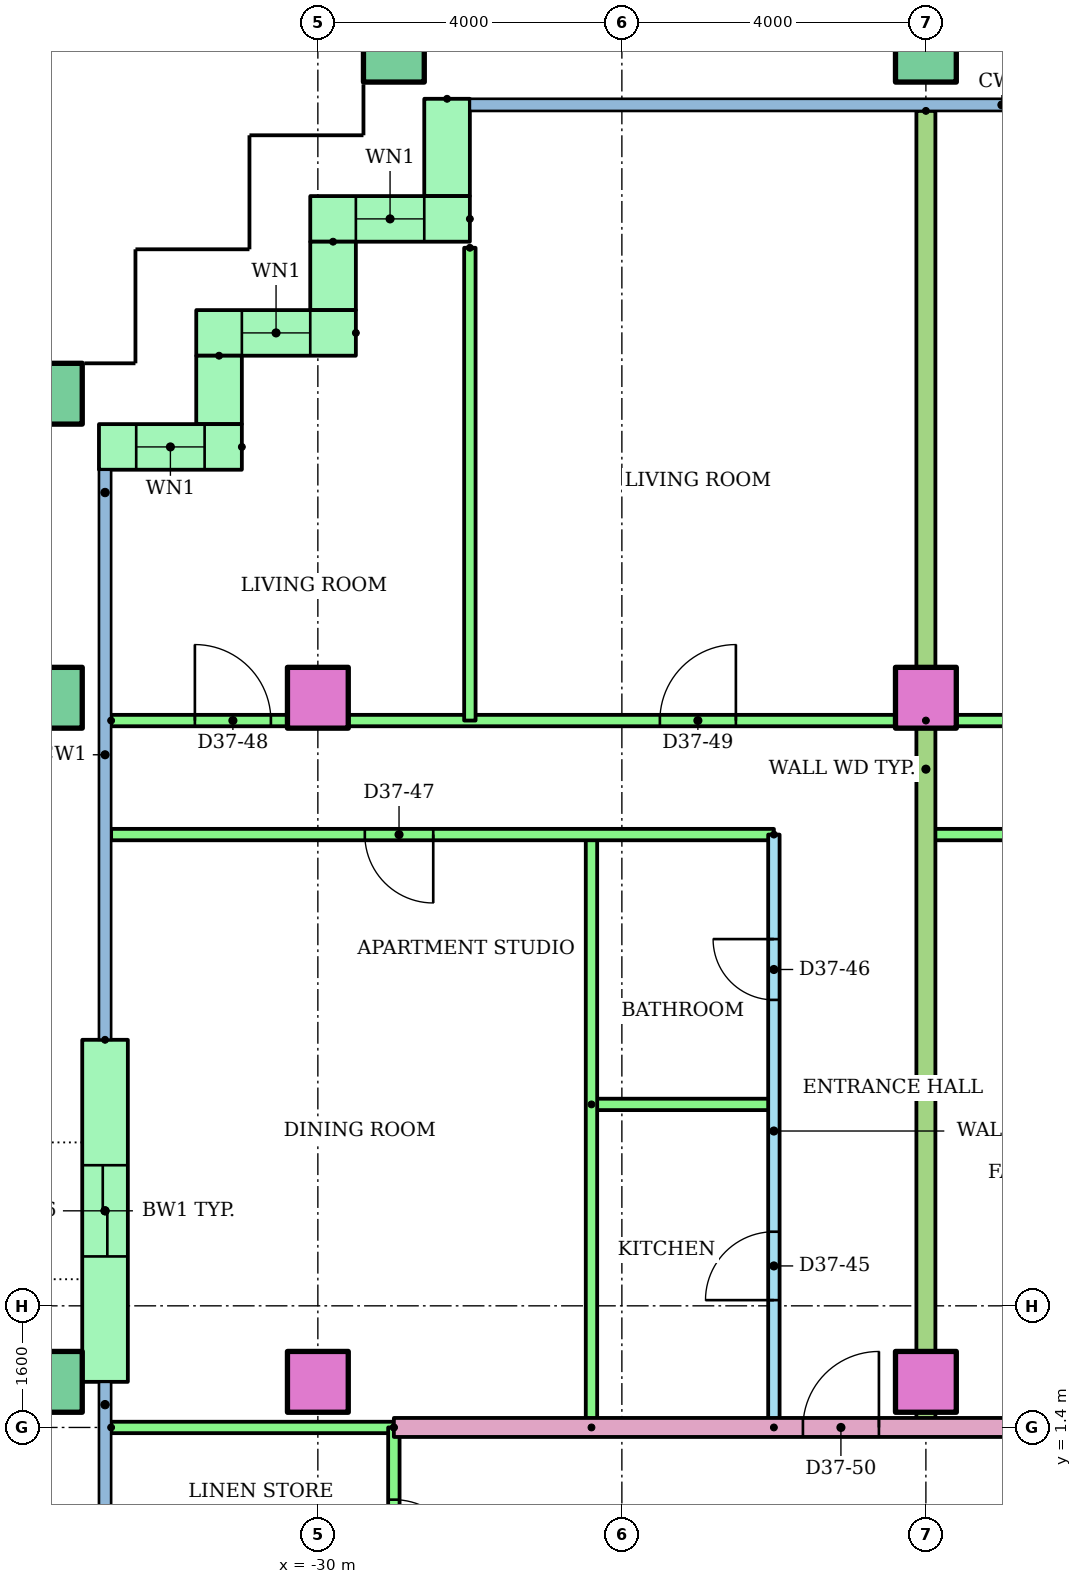
"""IFC4 building model, lengths in metres.
Left out: names, types, materials, properties, quantities, classifications, styles, units other than length and angle.
Written with IfcOpenShell. Run it as: python <this file> out.ifc"""

import sys

from ifc_helpers import new_model, si_unit, direction, frame, frame_2d, origin, origin_2d, place, context, subcontext, project, spatial, rectangle, hollow_rectangle, extrude, element, fill, save


model = new_model("IFC4")
c1 = context("Model", 3, precision=1e-05, world=origin(), true_north=direction((0.0, 1.0)))
c2 = subcontext(c1, "Body", "Model", "MODEL_VIEW")
j1 = project(units=[si_unit("LENGTHUNIT", "METRE"), si_unit("PLANEANGLEUNIT", "RADIAN")], contexts=[c1])
p1 = place(None, origin())
s1 = spatial("IfcSite", under=j1, at=p1, CompositionType="ELEMENT")
p2 = place(p1, origin())
s2 = spatial("IfcBuilding", under=s1, at=p2, CompositionType="ELEMENT")
p3 = place(p2, frame((0.0, 0.0, 142.2)))
s3 = spatial("IfcBuildingStorey", under=s2, at=p3, CompositionType="ELEMENT", Elevation=142.2)
p4 = place(p3, frame((-33.5, 2.0, 0.0)))
e1 = element("IfcColumn", 1, at=p4, inside=s3, PredefinedType="COLUMN", context=c2, shape_type="SweptSolid", body=[
    extrude(hollow_rectangle(XDim=0.8, YDim=0.8, WallThickness=0.04, at=origin_2d()), origin(), (0.0, 0.0, 1.0), 3.2),
])
for number, where in (
    (2, (-30.0, 2.0, 0.0)),
    (3, (-22.0, 2.0, 0.0)),
):
    element("IfcColumn", number, at=place(p3, frame(where)), inside=s3, PredefinedType="COLUMN", context=c2, shape_type="SweptSolid", body=[
        extrude(rectangle(XDim=0.8, YDim=0.8, at=origin_2d()), origin(), (0.0, 0.0, 1.0), 3.2),
    ])
p5 = place(p3, frame((-33.5, 11.0, 0.0)))
e4 = element("IfcColumn", 4, at=p5, inside=s3, PredefinedType="COLUMN", context=c2, shape_type="SweptSolid", body=[
    extrude(hollow_rectangle(XDim=0.8, YDim=0.8, WallThickness=0.04, at=origin_2d()), origin(), (0.0, 0.0, 1.0), 3.2),
])
for number, where in (
    (5, (-30.0, 11.0, 0.0)),
    (6, (-22.0, 11.0, 0.0)),
):
    element("IfcColumn", number, at=place(p3, frame(where)), inside=s3, PredefinedType="COLUMN", context=c2, shape_type="SweptSolid", body=[
        extrude(rectangle(XDim=0.8, YDim=0.8, at=origin_2d()), origin(), (0.0, 0.0, 1.0), 3.2),
    ])
for number, where in (
    (7, (-33.5, 15.0, 0.0)),
    (8, (-29.0, 19.5, 0.0)),
    (9, (-22.0, 19.5, 0.0)),
):
    element("IfcColumn", number, at=place(p3, frame(where)), inside=s3, PredefinedType="COLUMN", context=c2, shape_type="SweptSolid", body=[
        extrude(hollow_rectangle(XDim=0.8, YDim=0.8, WallThickness=0.04, at=origin_2d()), origin(), (0.0, 0.0, 1.0), 3.2),
    ])
p6 = place(p3, frame((-28.3, 18.88, 0.0), z_axis=(0.0, 0.0, 1.0), x_axis=(0.0, -1.0, 0.0)))
e10 = element("IfcWall", 10, at=p6, inside=s3, PredefinedType="STANDARD", context=c2, shape_type="SweptSolid", body=[
    extrude(rectangle(XDim=1.28, YDim=0.6, at=frame_2d((0.64, 0.0))), origin(), (0.0, 0.0, 1.0), 2.92),
])
p7 = place(p3, frame((-28.0, 17.3, 0.0), z_axis=(0.0, 0.0, 1.0), x_axis=(-1.0, 0.0, 0.0)))
e11 = element("IfcWall", 11, at=p7, inside=s3, PredefinedType="STANDARD", context=c2, shape_type="SweptSolid", body=[
    extrude(rectangle(XDim=2.1, YDim=0.6, at=frame_2d((1.05, 0.0))), origin(), (0.0, 0.0, 1.0), 2.92),
])
p8 = place(p7, frame((0.6, 0.0, 0.9)))
e12 = element("IfcOpeningElement", 12, at=p8, cuts=e11, PredefinedType="OPENING", context=c2, shape_type="SweptSolid", body=[
    extrude(rectangle(XDim=0.9, YDim=1.5, at=frame_2d((0.45, 0.75))), frame((0.0, 0.31, 0.0), z_axis=(0.0, -1.0, 0.0), x_axis=(1.0, 0.0, 0.0)), (0.0, 0.0, 1.0), 0.62),
])
p9 = place(p3, frame((-29.8, 17.0, 0.0), z_axis=(0.0, 0.0, 1.0), x_axis=(0.0, -1.0, 0.0)))
e13 = element("IfcWall", 13, at=p9, inside=s3, PredefinedType="STANDARD", context=c2, shape_type="SweptSolid", body=[
    extrude(rectangle(XDim=0.9, YDim=0.6, at=frame_2d((0.45, 0.0))), origin(), (0.0, 0.0, 1.0), 2.92),
])
p10 = place(p3, frame((-29.5, 15.8, 0.0), z_axis=(0.0, 0.0, 1.0), x_axis=(-1.0, 0.0, 0.0)))
e14 = element("IfcWall", 14, at=p10, inside=s3, PredefinedType="STANDARD", context=c2, shape_type="SweptSolid", body=[
    extrude(rectangle(XDim=2.1, YDim=0.6, at=frame_2d((1.05, 0.0))), origin(), (0.0, 0.0, 1.0), 2.92),
])
p11 = place(p10, frame((0.6, 0.0, 0.9)))
e15 = element("IfcOpeningElement", 15, at=p11, cuts=e14, PredefinedType="OPENING", context=c2, shape_type="SweptSolid", body=[
    extrude(rectangle(XDim=0.9, YDim=1.5, at=frame_2d((0.45, 0.75))), frame((0.0, 0.31, 0.0), z_axis=(0.0, -1.0, 0.0), x_axis=(1.0, 0.0, 0.0)), (0.0, 0.0, 1.0), 0.62),
])
p12 = place(p3, frame((-31.3, 15.5, 0.0), z_axis=(0.0, 0.0, 1.0), x_axis=(0.0, -1.0, 0.0)))
e16 = element("IfcWall", 16, at=p12, inside=s3, PredefinedType="STANDARD", context=c2, shape_type="SweptSolid", body=[
    extrude(rectangle(XDim=0.9, YDim=0.6, at=frame_2d((0.45, 0.0))), origin(), (0.0, 0.0, 1.0), 2.92),
])
p13 = place(p3, frame((-31.0, 14.3, 0.0), z_axis=(0.0, 0.0, 1.0), x_axis=(-1.0, 0.0, 0.0)))
e17 = element("IfcWall", 17, at=p13, inside=s3, PredefinedType="STANDARD", context=c2, shape_type="SweptSolid", body=[
    extrude(rectangle(XDim=1.88, YDim=0.6, at=frame_2d((0.94, 0.0))), origin(), (0.0, 0.0, 1.0), 2.92),
])
p14 = place(p13, frame((0.49, 0.0, 0.9)))
e18 = element("IfcOpeningElement", 18, at=p14, cuts=e17, PredefinedType="OPENING", context=c2, shape_type="SweptSolid", body=[
    extrude(rectangle(XDim=0.9, YDim=1.5, at=frame_2d((0.45, 0.75))), frame((0.0, 0.31, 0.0), z_axis=(0.0, -1.0, 0.0), x_axis=(1.0, 0.0, 0.0)), (0.0, 0.0, 1.0), 0.62),
])
p15 = place(p3, frame((-32.8, 6.5, 0.0), z_axis=(0.0, 0.0, 1.0), x_axis=(0.0, -1.0, 0.0)))
e19 = element("IfcWall", 19, at=p15, inside=s3, PredefinedType="STANDARD", context=c2, shape_type="SweptSolid", body=[
    extrude(rectangle(XDim=4.5, YDim=0.6, at=frame_2d((2.25, 0.0))), origin(), (0.0, 0.0, 1.0), 2.92),
])
p16 = place(p15, frame((1.65, 0.0, 0.0)))
e20 = element("IfcOpeningElement", 20, at=p16, cuts=e19, PredefinedType="OPENING", context=c2, shape_type="SweptSolid", body=[
    extrude(rectangle(XDim=1.2, YDim=2.1, at=frame_2d((0.6, 1.05))), frame((0.0, 0.31, 0.0), z_axis=(0.0, -1.0, 0.0), x_axis=(1.0, 0.0, 0.0)), (0.0, 0.0, 1.0), 0.62),
])
p17 = place(p3, frame((-24.0, 1.4, 0.0), z_axis=(0.0, 0.0, 1.0), x_axis=(0.0, 1.0, 0.0)))
e21 = element("IfcWall", 21, at=p17, inside=s3, PredefinedType="PARTITIONING", context=c2, shape_type="SweptSolid", body=[
    extrude(rectangle(XDim=7.8, YDim=0.15, at=frame_2d((3.9, 0.0))), origin(), (0.0, 0.0, 1.0), 2.4),
])
p18 = place(p17, frame((1.675, 0.0, 0.0)))
e22 = element("IfcOpeningElement", 22, at=p18, cuts=e21, PredefinedType="OPENING", context=c2, shape_type="SweptSolid", body=[
    extrude(rectangle(XDim=0.9, YDim=2.1, at=frame_2d((0.45, 1.05))), frame((0.0, 0.085, 0.0), z_axis=(0.0, -1.0, 0.0), x_axis=(1.0, 0.0, 0.0)), (0.0, 0.0, 1.0), 0.17),
])
p19 = place(p17, frame((5.625, 0.0, 0.0)))
e23 = element("IfcOpeningElement", 23, at=p19, cuts=e21, PredefinedType="OPENING", context=c2, shape_type="SweptSolid", body=[
    extrude(rectangle(XDim=0.8, YDim=2.1, at=frame_2d((0.4, 1.05))), frame((0.0, 0.085, 0.0), z_axis=(0.0, -1.0, 0.0), x_axis=(1.0, 0.0, 0.0)), (0.0, 0.0, 1.0), 0.17),
])
p20 = place(p3, frame((-26.4, 5.65, 0.0)))
e24 = element("IfcWall", 24, at=p20, inside=s3, PredefinedType="PARTITIONING", context=c2, shape_type="SweptSolid", body=[
    extrude(rectangle(XDim=2.4, YDim=0.15, at=frame_2d((1.2, 0.0))), origin(), (0.0, 0.0, 1.0), 2.4),
])
p21 = place(p3, frame((-26.4, 1.4, 0.0), z_axis=(0.0, 0.0, 1.0), x_axis=(0.0, 1.0, 0.0)))
e25 = element("IfcWall", 25, at=p21, inside=s3, PredefinedType="PARTITIONING", context=c2, shape_type="SweptSolid", body=[
    extrude(rectangle(XDim=7.8, YDim=0.15, at=frame_2d((3.9, 0.0))), origin(), (0.0, 0.0, 1.0), 2.4),
])
p22 = place(p3, frame((-24.0, 9.2, 0.0), z_axis=(0.0, 0.0, 1.0), x_axis=(-1.0, 0.0, 0.0)))
e26 = element("IfcWall", 26, at=p22, inside=s3, PredefinedType="PARTITIONING", context=c2, shape_type="SweptSolid", body=[
    extrude(rectangle(XDim=8.72, YDim=0.15, at=frame_2d((4.36, 0.0))), origin(), (0.0, 0.0, 1.0), 2.4),
])
p23 = place(p22, frame((4.482, 0.0, 0.0)))
e27 = element("IfcOpeningElement", 27, at=p23, cuts=e26, PredefinedType="OPENING", context=c2, shape_type="SweptSolid", body=[
    extrude(rectangle(XDim=0.9, YDim=2.1, at=frame_2d((0.45, 1.05))), frame((0.0, 0.085, 0.0), z_axis=(0.0, -1.0, 0.0), x_axis=(1.0, 0.0, 0.0)), (0.0, 0.0, 1.0), 0.17),
])
p24 = place(p3, frame((-32.72, 10.7, 0.0)))
e28 = element("IfcWall", 28, at=p24, inside=s3, PredefinedType="PARTITIONING", context=c2, shape_type="SweptSolid", body=[
    extrude(rectangle(XDim=10.72, YDim=0.15, at=frame_2d((5.36, 0.0))), origin(), (0.0, 0.0, 1.0), 2.4),
])
p25 = place(p24, frame((1.102, 0.0, 0.0)))
e29 = element("IfcOpeningElement", 29, at=p25, cuts=e28, PredefinedType="OPENING", context=c2, shape_type="SweptSolid", body=[
    extrude(rectangle(XDim=1.0, YDim=2.1, at=frame_2d((0.5, 1.05))), frame((0.0, 0.085, 0.0), z_axis=(0.0, -1.0, 0.0), x_axis=(1.0, 0.0, 0.0)), (0.0, 0.0, 1.0), 0.17),
])
p26 = place(p24, frame((7.22, 0.0, 0.0)))
e30 = element("IfcOpeningElement", 30, at=p26, cuts=e28, PredefinedType="OPENING", context=c2, shape_type="SweptSolid", body=[
    extrude(rectangle(XDim=1.0, YDim=2.1, at=frame_2d((0.5, 1.05))), frame((0.0, 0.085, 0.0), z_axis=(0.0, -1.0, 0.0), x_axis=(1.0, 0.0, 0.0)), (0.0, 0.0, 1.0), 0.17),
])
p27 = place(p3, frame((-28.0, 16.92, 0.0), z_axis=(0.0, 0.0, 1.0), x_axis=(0.0, -1.0, 0.0)))
e31 = element("IfcWall", 31, at=p27, inside=s3, PredefinedType="PARTITIONING", context=c2, shape_type="SweptSolid", body=[
    extrude(rectangle(XDim=6.22, YDim=0.15, at=frame_2d((3.11, 0.0))), origin(), (0.0, 0.0, 1.0), 2.4),
])
p28 = place(p3, frame((-16.0, 9.2, 0.0), z_axis=(0.0, 0.0, 1.0), x_axis=(-1.0, 0.0, 0.0)))
e32 = element("IfcWall", 32, at=p28, inside=s3, PredefinedType="PARTITIONING", context=c2, shape_type="SweptSolid", body=[
    extrude(rectangle(XDim=6.0, YDim=0.15, at=frame_2d((3.0, 0.0))), origin(), (0.0, 0.0, 1.0), 2.4),
])
p29 = place(p28, frame((3.75, 0.0, 0.0)))
e33 = element("IfcOpeningElement", 33, at=p29, cuts=e32, PredefinedType="OPENING", context=c2, shape_type="SweptSolid", body=[
    extrude(rectangle(XDim=0.9, YDim=2.1, at=frame_2d((0.45, 1.05))), frame((0.0, 0.085, 0.0), z_axis=(0.0, -1.0, 0.0), x_axis=(1.0, 0.0, 0.0)), (0.0, 0.0, 1.0), 0.17),
])
p30 = place(p3, frame((-22.0, 10.7, 0.0)))
e34 = element("IfcWall", 34, at=p30, inside=s3, PredefinedType="PARTITIONING", context=c2, shape_type="SweptSolid", body=[
    extrude(rectangle(XDim=8.0, YDim=0.15, at=frame_2d((4.0, 0.0))), origin(), (0.0, 0.0, 1.0), 2.4),
])
p31 = place(p30, frame((3.5, 0.0, 0.0)))
e35 = element("IfcOpeningElement", 35, at=p31, cuts=e34, PredefinedType="OPENING", context=c2, shape_type="SweptSolid", body=[
    extrude(rectangle(XDim=1.0, YDim=2.1, at=frame_2d((0.5, 1.05))), frame((0.0, 0.085, 0.0), z_axis=(0.0, -1.0, 0.0), x_axis=(1.0, 0.0, 0.0)), (0.0, 0.0, 1.0), 0.17),
])
p32 = place(p3, frame((-22.0, 18.721, 0.0), z_axis=(0.0, 0.0, 1.0), x_axis=(0.0, -1.0, 0.0)))
e36 = element("IfcWall", 36, at=p32, inside=s3, PredefinedType="PARTITIONING", context=c2, shape_type="SweptSolid", body=[
    extrude(rectangle(XDim=17.321, YDim=0.25, at=frame_2d((8.661, 0.0))), origin(), (0.0, 0.0, 1.0), 2.4),
])
p33 = place(p3, frame((-29.0, 1.4, 0.0)))
e37 = element("IfcWall", 37, at=p33, inside=s3, PredefinedType="PARTITIONING", context=c2, shape_type="SweptSolid", body=[
    extrude(rectangle(XDim=15.0, YDim=0.25, at=frame_2d((7.5, 0.0))), origin(), (0.0, 0.0, 1.0), 2.4),
])
p34 = place(p33, frame((5.382, 0.0, 0.0)))
e38 = element("IfcOpeningElement", 38, at=p34, cuts=e37, PredefinedType="OPENING", context=c2, shape_type="SweptSolid", body=[
    extrude(rectangle(XDim=1.0, YDim=2.1, at=frame_2d((0.5, 1.05))), frame((0.0, 0.135, 0.0), z_axis=(0.0, -1.0, 0.0), x_axis=(1.0, 0.0, 0.0)), (0.0, 0.0, 1.0), 0.27),
])
p35 = place(p33, frame((13.5, 0.0, 0.0)))
e39 = element("IfcOpeningElement", 39, at=p35, cuts=e37, PredefinedType="OPENING", context=c2, shape_type="SweptSolid", body=[
    extrude(rectangle(XDim=1.0, YDim=2.1, at=frame_2d((0.5, 1.05))), frame((0.0, 0.135, 0.0), z_axis=(0.0, -1.0, 0.0), x_axis=(1.0, 0.0, 0.0)), (0.0, 0.0, 1.0), 0.27),
])
p36 = place(p3, frame((-32.72, 1.4, 0.0)))
e40 = element("IfcWall", 40, at=p36, inside=s3, PredefinedType="PARTITIONING", context=c2, shape_type="SweptSolid", body=[
    extrude(rectangle(XDim=3.72, YDim=0.15, at=frame_2d((1.86, 0.0))), origin(), (0.0, 0.0, 1.0), 2.4),
])
p37 = place(p3, frame((-29.0, 1.4, 0.0), z_axis=(0.0, 0.0, 1.0), x_axis=(0.0, -1.0, 0.0)))
e41 = element("IfcWall", 41, at=p37, inside=s3, PredefinedType="PARTITIONING", context=c2, shape_type="SweptSolid", body=[
    extrude(rectangle(XDim=2.8, YDim=0.15, at=frame_2d((1.4, 0.0))), origin(), (0.0, 0.0, 1.0), 2.4),
])
p38 = place(p37, frame((0.95, 0.0, 0.0)))
e42 = element("IfcOpeningElement", 42, at=p38, cuts=e41, PredefinedType="OPENING", context=c2, shape_type="SweptSolid", body=[
    extrude(rectangle(XDim=0.9, YDim=2.1, at=frame_2d((0.45, 1.05))), frame((0.0, 0.085, 0.0), z_axis=(0.0, -1.0, 0.0), x_axis=(1.0, 0.0, 0.0)), (0.0, 0.0, 1.0), 0.17),
])
p39 = place(p8, origin())
e43 = element("IfcWindow", 43, at=p39, inside=s3, PartitioningType="SINGLE_PANEL", PredefinedType="WINDOW", context=c2, shape_type="SweptSolid", body=[
    extrude(rectangle(XDim=0.9, YDim=1.5, at=frame_2d((0.45, 0.75))), frame((0.0, 0.03, 0.0), z_axis=(0.0, -1.0, 0.0), x_axis=(1.0, 0.0, 0.0)), (0.0, 0.0, 1.0), 0.06),
])
fill(e12, e43)
p40 = place(p11, origin())
e44 = element("IfcWindow", 44, at=p40, inside=s3, PartitioningType="SINGLE_PANEL", PredefinedType="WINDOW", context=c2, shape_type="SweptSolid", body=[
    extrude(rectangle(XDim=0.9, YDim=1.5, at=frame_2d((0.45, 0.75))), frame((0.0, 0.03, 0.0), z_axis=(0.0, -1.0, 0.0), x_axis=(1.0, 0.0, 0.0)), (0.0, 0.0, 1.0), 0.06),
])
fill(e15, e44)
p41 = place(p14, origin())
e45 = element("IfcWindow", 45, at=p41, inside=s3, PartitioningType="SINGLE_PANEL", PredefinedType="WINDOW", context=c2, shape_type="SweptSolid", body=[
    extrude(rectangle(XDim=0.9, YDim=1.5, at=frame_2d((0.45, 0.75))), frame((0.0, 0.03, 0.0), z_axis=(0.0, -1.0, 0.0), x_axis=(1.0, 0.0, 0.0)), (0.0, 0.0, 1.0), 0.06),
])
fill(e18, e45)
p42 = place(p18, origin())
e46 = element("IfcDoor", 46, at=p42, inside=s3, OperationType="SINGLE_SWING_LEFT", PredefinedType="DOOR", context=c2, shape_type="SweptSolid", body=[
    extrude(rectangle(XDim=0.9, YDim=2.1, at=frame_2d((0.45, 1.05))), frame((0.0, 0.025, 0.0), z_axis=(0.0, -1.0, 0.0), x_axis=(1.0, 0.0, 0.0)), (0.0, 0.0, 1.0), 0.05),
])
fill(e22, e46)
p43 = place(p19, origin())
e47 = element("IfcDoor", 47, at=p43, inside=s3, OperationType="SINGLE_SWING_RIGHT", PredefinedType="DOOR", context=c2, shape_type="SweptSolid", body=[
    extrude(rectangle(XDim=0.8, YDim=2.1, at=frame_2d((0.4, 1.05))), frame((0.0, 0.025, 0.0), z_axis=(0.0, -1.0, 0.0), x_axis=(1.0, 0.0, 0.0)), (0.0, 0.0, 1.0), 0.05),
])
fill(e23, e47)
p44 = place(p23, origin())
e48 = element("IfcDoor", 48, at=p44, inside=s3, OperationType="SINGLE_SWING_LEFT", PredefinedType="DOOR", context=c2, shape_type="SweptSolid", body=[
    extrude(rectangle(XDim=0.9, YDim=2.1, at=frame_2d((0.45, 1.05))), frame((0.0, 0.025, 0.0), z_axis=(0.0, -1.0, 0.0), x_axis=(1.0, 0.0, 0.0)), (0.0, 0.0, 1.0), 0.05),
])
fill(e27, e48)
p45 = place(p25, origin())
e49 = element("IfcDoor", 49, at=p45, inside=s3, OperationType="SINGLE_SWING_LEFT", PredefinedType="DOOR", context=c2, shape_type="SweptSolid", body=[
    extrude(rectangle(XDim=1.0, YDim=2.1, at=frame_2d((0.5, 1.05))), frame((0.0, 0.025, 0.0), z_axis=(0.0, -1.0, 0.0), x_axis=(1.0, 0.0, 0.0)), (0.0, 0.0, 1.0), 0.05),
])
fill(e29, e49)
p46 = place(p26, origin())
e50 = element("IfcDoor", 50, at=p46, inside=s3, OperationType="SINGLE_SWING_RIGHT", PredefinedType="DOOR", context=c2, shape_type="SweptSolid", body=[
    extrude(rectangle(XDim=1.0, YDim=2.1, at=frame_2d((0.5, 1.05))), frame((0.0, 0.025, 0.0), z_axis=(0.0, -1.0, 0.0), x_axis=(1.0, 0.0, 0.0)), (0.0, 0.0, 1.0), 0.05),
])
fill(e30, e50)
p47 = place(p34, origin())
e51 = element("IfcDoor", 51, at=p47, inside=s3, OperationType="SINGLE_SWING_RIGHT", PredefinedType="DOOR", context=c2, shape_type="SweptSolid", body=[
    extrude(rectangle(XDim=1.0, YDim=2.1, at=frame_2d((0.5, 1.05))), frame((0.0, 0.025, 0.0), z_axis=(0.0, -1.0, 0.0), x_axis=(1.0, 0.0, 0.0)), (0.0, 0.0, 1.0), 0.05),
])
fill(e38, e51)
p48 = place(p38, origin())
e52 = element("IfcDoor", 52, at=p48, inside=s3, OperationType="SINGLE_SWING_RIGHT", PredefinedType="DOOR", context=c2, shape_type="SweptSolid", body=[
    extrude(rectangle(XDim=0.9, YDim=2.1, at=frame_2d((0.45, 1.05))), frame((0.0, 0.025, 0.0), z_axis=(0.0, -1.0, 0.0), x_axis=(1.0, 0.0, 0.0)), (0.0, 0.0, 1.0), 0.05),
])
fill(e42, e52)
p49 = place(p16, origin())
e53 = element("IfcDoor", 53, at=p49, inside=s3, OperationType="SLIDING_TO_LEFT", PredefinedType="DOOR", context=c2, shape_type="SweptSolid", body=[
    extrude(rectangle(XDim=1.2, YDim=2.1, at=frame_2d((0.6, 1.05))), frame((0.0, 0.025, 0.0), z_axis=(0.0, -1.0, 0.0), x_axis=(1.0, 0.0, 0.0)), (0.0, 0.0, 1.0), 0.05),
])
fill(e20, e53)
save(model, sys.argv[1])
